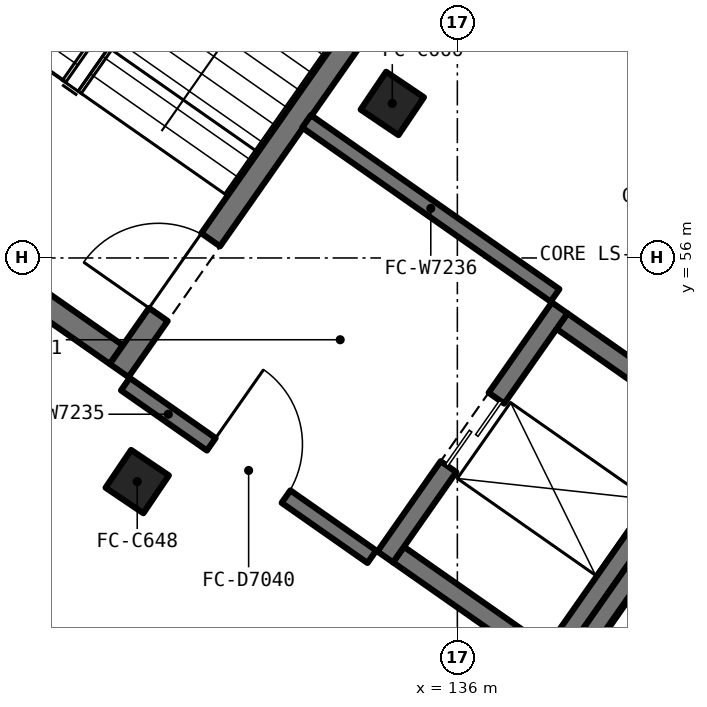
"""IFC4 building model, lengths in metres.
Left out: names, types, materials, properties, quantities, classifications, styles, units other than length and angle.
Written with IfcOpenShell. Run it as: python <this file> out.ifc"""

import sys

from ifc_helpers import new_model, si_unit, direction, frame, frame_2d, origin, origin_2d, place, context, subcontext, project, spatial, rectangle, extrude, element, fill, save


model = new_model("IFC4")
c1 = context("Model", 3, precision=1e-05, world=origin(), true_north=direction((0.0, 1.0)))
c2 = subcontext(c1, "Body", "Model", "MODEL_VIEW")
j1 = project(units=[si_unit("LENGTHUNIT", "METRE"), si_unit("PLANEANGLEUNIT", "RADIAN")], contexts=[c1])
p1 = place(None, origin())
s1 = spatial("IfcSite", under=j1, at=p1, CompositionType="ELEMENT")
p2 = place(p1, origin())
s2 = spatial("IfcBuilding", under=s1, at=p2, CompositionType="ELEMENT")
p3 = place(p2, frame((0.0, 0.0, 11.5)))
s3 = spatial("IfcBuildingStorey", under=s2, at=p3, CompositionType="ELEMENT", Elevation=11.5)
for number, where, z_axis, x_axis in (
    (1, (131.788, 53.058, 0.0), (0.0, 0.0, 1.0), (0.829, -0.559, 0.0)),
    (2, (135.144, 58.033, 0.0), (0.0, 0.0, 1.0), (0.829, -0.559, 0.0)),
):
    element("IfcColumn", number, at=place(p3, frame(where, z_axis=z_axis, x_axis=x_axis)), inside=s3, PredefinedType="COLUMN", context=c2, shape_type="SweptSolid", body=[
        extrude(rectangle(XDim=0.6, YDim=0.6, at=origin_2d()), origin(), (0.0, 0.0, 1.0), 5.5),
    ])
p4 = place(p3, frame((127.418, 57.596, 0.0), z_axis=(0.0, 0.0, 1.0), x_axis=(0.819096538389, -0.573655698829, 0.0)))
e3 = element("IfcWall", 3, at=p4, inside=s3, PredefinedType="SOLIDWALL", context=c2, shape_type="SweptSolid", body=[
    extrude(rectangle(XDim=4.999, YDim=0.3, at=frame_2d((2.5, 0.0))), origin(), (0.0, 0.0, 1.0), 5.5),
])
p5 = place(p3, frame((131.55, 54.519, 0.0), z_axis=(0.0, 0.0, 1.0), x_axis=(0.573563925118, 0.819160804606, 0.0)))
e4 = element("IfcWall", 4, at=p5, inside=s3, PredefinedType="SOLIDWALL", context=c2, shape_type="SweptSolid", body=[
    extrude(rectangle(XDim=10.0, YDim=0.3, at=frame_2d((5.0, 0.0))), origin(), (0.0, 0.0, 1.0), 5.5),
])
p6 = place(p5, frame((0.9, 0.0, 0.0)))
e5 = element("IfcOpeningElement", 5, at=p6, cuts=e4, PredefinedType="OPENING", context=c2, shape_type="SweptSolid", body=[
    extrude(rectangle(XDim=1.2, YDim=2.1, at=frame_2d((0.6, 1.05))), frame((0.0, 0.162, 0.0), z_axis=(0.0, -1.0, 0.0), x_axis=(1.0, 0.0, 0.0)), (0.0, 0.0, 1.0), 0.324),
])
p7 = place(p3, frame((132.944, 65.751, 0.0), z_axis=(0.0, 0.0, 1.0), x_axis=(-0.573514776444, -0.819195215563, 0.0)))
e6 = element("IfcWall", 6, at=p7, inside=s3, PredefinedType="SOLIDWALL", context=c2, shape_type="SweptSolid", body=[
    extrude(rectangle(XDim=10.0, YDim=0.3, at=frame_2d((5.0, 0.0))), origin(), (0.0, 0.0, 1.0), 5.5),
])
p8 = place(p3, frame((135.225, 52.098, 0.0), z_axis=(0.0, 0.0, 1.0), x_axis=(0.819366508838, -0.573270027295, 0.0)))
e7 = element("IfcWall", 7, at=p8, inside=s3, PredefinedType="SOLIDWALL", context=c2, shape_type="SweptSolid", body=[
    extrude(rectangle(XDim=2.301, YDim=0.25, at=frame_2d((1.15, 0.0))), origin(), (0.0, 0.0, 1.0), 5.5),
])
p9 = place(p3, frame((137.141, 50.605, 0.0), z_axis=(0.0, 0.0, 1.0), x_axis=(0.573572956461, 0.819154480923, 0.0)))
e8 = element("IfcWall", 8, at=p9, inside=s3, PredefinedType="SOLIDWALL", context=c2, shape_type="SweptSolid", body=[
    extrude(rectangle(XDim=4.0, YDim=0.25, at=frame_2d((2.0, 0.0))), origin(), (0.0, 0.0, 1.0), 5.5),
])
p10 = place(p3, frame((139.261, 53.85, 0.0), z_axis=(0.0, 0.0, 1.0), x_axis=(-0.819226933165, 0.573469469089, 0.0)))
e9 = element("IfcWall", 9, at=p10, inside=s3, PredefinedType="SOLIDWALL", context=c2, shape_type="SweptSolid", body=[
    extrude(rectangle(XDim=2.3, YDim=0.25, at=frame_2d((1.15, 0.0))), origin(), (0.0, 0.0, 1.0), 5.5),
])
p11 = place(p3, frame((137.346, 55.343, 0.0), z_axis=(0.0, 0.0, 1.0), x_axis=(-0.573736768582, -0.819039755065, 0.0)))
e10 = element("IfcWall", 10, at=p11, inside=s3, PredefinedType="SOLIDWALL", context=c2, shape_type="SweptSolid", body=[
    extrude(rectangle(XDim=4.0, YDim=0.25, at=frame_2d((2.0, 0.0))), origin(), (0.0, 0.0, 1.0), 5.5),
])
p12 = place(p11, frame((1.45, 0.0, 0.0)))
e11 = element("IfcOpeningElement", 11, at=p12, cuts=e10, PredefinedType="OPENING", context=c2, shape_type="SweptSolid", body=[
    extrude(rectangle(XDim=1.1, YDim=2.1, at=frame_2d((0.55, 1.05))), frame((0.0, 0.137, 0.0), z_axis=(0.0, -1.0, 0.0), x_axis=(1.0, 0.0, 0.0)), (0.0, 0.0, 1.0), 0.274),
])
p13 = place(p3, frame((139.639, 53.737, 0.0), z_axis=(0.0, 0.0, 1.0), x_axis=(-0.573572956461, -0.819154480923, 0.0)))
e12 = element("IfcWall", 12, at=p13, inside=s3, PredefinedType="SOLIDWALL", context=c2, shape_type="SweptSolid", body=[
    extrude(rectangle(XDim=4.0, YDim=0.25, at=frame_2d((2.0, 0.0))), origin(), (0.0, 0.0, 1.0), 5.5),
])
p14 = place(p3, frame((131.632, 54.34, 0.0), z_axis=(0.0, 0.0, 1.0), x_axis=(0.81911891796, -0.573623742744, 0.0)))
e13 = element("IfcWall", 13, at=p14, inside=s3, PredefinedType="PARTITIONING", context=c2, shape_type="SweptSolid", body=[
    extrude(rectangle(XDim=3.959, YDim=0.2, at=frame_2d((1.979, 0.0))), origin(), (0.0, 0.0, 1.0), 5.28),
])
p15 = place(p14, frame((1.38, 0.0, 0.0)))
e14 = element("IfcOpeningElement", 14, at=p15, cuts=e13, PredefinedType="OPENING", context=c2, shape_type="SweptSolid", body=[
    extrude(rectangle(XDim=1.2, YDim=2.1, at=frame_2d((0.6, 1.05))), frame((0.0, 0.112, 0.0), z_axis=(0.0, -1.0, 0.0), x_axis=(1.0, 0.0, 0.0)), (0.0, 0.0, 1.0), 0.224),
])
p16 = place(p3, frame((137.285, 55.508, 0.0), z_axis=(0.0, 0.0, 1.0), x_axis=(-0.819125561737, 0.573614255497, 0.0)))
e15 = element("IfcWall", 15, at=p16, inside=s3, PredefinedType="PARTITIONING", context=c2, shape_type="SweptSolid", body=[
    extrude(rectangle(XDim=3.99, YDim=0.2, at=frame_2d((1.995, 0.0))), origin(), (0.0, 0.0, 1.0), 5.28),
])
p17 = place(p6, origin())
e16 = element("IfcDoor", 16, at=p17, inside=s3, OperationType="SINGLE_SWING_LEFT", PredefinedType="DOOR", context=c2, shape_type="SweptSolid", body=[
    extrude(rectangle(XDim=1.2, YDim=2.1, at=frame_2d((0.6, 1.05))), frame((0.0, 0.025, 0.0), z_axis=(0.0, -1.0, 0.0), x_axis=(1.0, 0.0, 0.0)), (0.0, 0.0, 1.0), 0.05),
])
fill(e5, e16)
p18 = place(p12, origin())
e17 = element("IfcDoor", 17, at=p18, inside=s3, OperationType="DOUBLE_DOOR_SLIDING", PredefinedType="DOOR", context=c2, shape_type="SweptSolid", body=[
    extrude(rectangle(XDim=1.1, YDim=2.1, at=frame_2d((0.55, 1.05))), frame((0.0, 0.025, 0.0), z_axis=(0.0, -1.0, 0.0), x_axis=(1.0, 0.0, 0.0)), (0.0, 0.0, 1.0), 0.05),
])
fill(e11, e17)
p19 = place(p15, origin())
e18 = element("IfcDoor", 18, at=p19, inside=s3, OperationType="SINGLE_SWING_LEFT", PredefinedType="DOOR", context=c2, shape_type="SweptSolid", body=[
    extrude(rectangle(XDim=1.2, YDim=2.1, at=frame_2d((0.6, 1.05))), frame((0.0, 0.025, 0.0), z_axis=(0.0, -1.0, 0.0), x_axis=(1.0, 0.0, 0.0)), (0.0, 0.0, 1.0), 0.05),
])
fill(e14, e18)
save(model, sys.argv[1])
